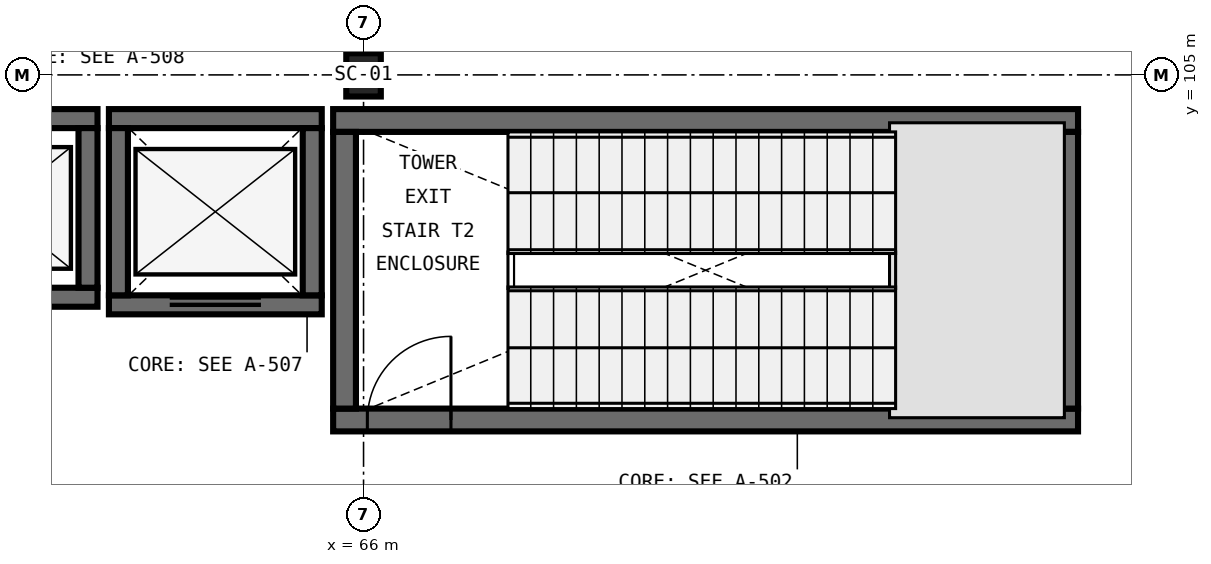
"""IFC4 building model, lengths in metres.
Left out: names, types, materials, properties, quantities, classifications, styles, units other than length and angle.
Written with IfcOpenShell. Run it as: python <this file> out.ifc"""

import sys

from ifc_helpers import new_model, si_unit, direction, frame, frame_2d, origin, origin_2d, place, context, subcontext, project, spatial, rectangle, i_section, extrude, element, fill, save


model = new_model("IFC4")
c1 = context("Model", 3, precision=1e-05, world=origin(), true_north=direction((0.0, 1.0)))
c2 = subcontext(c1, "Body", "Model", "MODEL_VIEW")
j1 = project(units=[si_unit("LENGTHUNIT", "METRE"), si_unit("PLANEANGLEUNIT", "RADIAN")], contexts=[c1])
p1 = place(None, origin())
s1 = spatial("IfcSite", under=j1, at=p1, CompositionType="ELEMENT")
p2 = place(p1, origin())
s2 = spatial("IfcBuilding", under=s1, at=p2, CompositionType="ELEMENT")
p3 = place(p2, frame((0.0, 0.0, 6.0)))
s3 = spatial("IfcBuildingStorey", under=s2, at=p3, CompositionType="ELEMENT", Elevation=6.0)
p4 = place(p3, frame((66.0, 105.0, 0.0), z_axis=(0.0, 0.0, 1.0), x_axis=(1.0, 0.0, 0.0)))
e1 = element("IfcColumn", 1, at=p4, inside=s3, PredefinedType="COLUMN", context=c2, shape_type="SweptSolid", body=[
    extrude(i_section(OverallWidth=0.454, OverallDepth=0.569, WebThickness=0.078, FlangeThickness=0.125, FilletRadius=0.031, at=origin_2d()), origin(), (0.0, 0.0, 1.0), 6.0),
])
p5 = place(p3, frame((65.6, 100.46, 0.0), z_axis=(0.0, 0.0, 1.0), x_axis=(1.0, 0.0, 0.0)))
e2 = element("IfcWall", 2, at=p5, inside=s3, PredefinedType="SHEAR", context=c2, shape_type="SweptSolid", body=[
    extrude(rectangle(XDim=9.8, YDim=0.3, at=frame_2d((4.9, 0.0))), origin(), (0.0, 0.0, 1.0), 6.0),
])
p6 = place(p5, frame((0.45, 0.0, 0.0)))
e3 = element("IfcOpeningElement", 3, at=p6, cuts=e2, PredefinedType="OPENING", context=c2, shape_type="SweptSolid", body=[
    extrude(rectangle(XDim=1.1, YDim=2.2, at=frame_2d((0.55, 1.1))), frame((0.0, 0.165, 0.0), z_axis=(0.0, -1.0, 0.0), x_axis=(1.0, 0.0, 0.0)), (0.0, 0.0, 1.0), 0.33),
])
p7 = place(p3, frame((75.4, 104.4, 0.0), z_axis=(0.0, 0.0, 1.0), x_axis=(-1.0, 0.0, 0.0)))
e4 = element("IfcWall", 4, at=p7, inside=s3, PredefinedType="SHEAR", context=c2, shape_type="SweptSolid", body=[
    extrude(rectangle(XDim=9.8, YDim=0.3, at=frame_2d((4.9, 0.0))), origin(), (0.0, 0.0, 1.0), 6.0),
])
for number, where, z_axis, x_axis in (
    (5, (65.75, 104.25, 0.0), (0.0, 0.0, 1.0), (0.0, -1.0, 0.0)),
    (6, (75.25, 100.61, 0.0), (0.0, 0.0, 1.0), (0.0, 1.0, 0.0)),
):
    element("IfcWall", number, at=place(p3, frame(where, z_axis=z_axis, x_axis=x_axis)), inside=s3, PredefinedType="SHEAR", context=c2, shape_type="SweptSolid", body=[
        extrude(rectangle(XDim=3.64, YDim=0.3, at=frame_2d((1.82, 0.0))), origin(), (0.0, 0.0, 1.0), 6.0),
    ])
p8 = place(p3, frame((62.65, 101.975, 0.0), z_axis=(0.0, 0.0, 1.0), x_axis=(1.0, 0.0, 0.0)))
e7 = element("IfcWall", 7, at=p8, inside=s3, PredefinedType="SHEAR", context=c2, shape_type="SweptSolid", body=[
    extrude(rectangle(XDim=2.8, YDim=0.25, at=frame_2d((1.4, 0.0))), origin(), (0.0, 0.0, 1.0), 6.0),
])
p9 = place(p8, frame((0.8, 0.0, 0.0)))
e8 = element("IfcOpeningElement", 8, at=p9, cuts=e7, PredefinedType="OPENING", context=c2, shape_type="SweptSolid", body=[
    extrude(rectangle(XDim=1.2, YDim=2.2, at=frame_2d((0.6, 1.1))), frame((0.0, 0.14, 0.0), z_axis=(0.0, -1.0, 0.0), x_axis=(1.0, 0.0, 0.0)), (0.0, 0.0, 1.0), 0.28),
])
p10 = place(p3, frame((65.45, 104.425, 0.0), z_axis=(0.0, 0.0, 1.0), x_axis=(-1.0, 0.0, 0.0)))
e9 = element("IfcWall", 9, at=p10, inside=s3, PredefinedType="SHEAR", context=c2, shape_type="SweptSolid", body=[
    extrude(rectangle(XDim=2.8, YDim=0.25, at=frame_2d((1.4, 0.0))), origin(), (0.0, 0.0, 1.0), 6.0),
])
for number, where, z_axis, x_axis in (
    (10, (62.775, 104.3, 0.0), (0.0, 0.0, 1.0), (0.0, -1.0, 0.0)),
    (11, (65.325, 102.1, 0.0), (0.0, 0.0, 1.0), (0.0, 1.0, 0.0)),
):
    element("IfcWall", number, at=place(p3, frame(where, z_axis=z_axis, x_axis=x_axis)), inside=s3, PredefinedType="SHEAR", context=c2, shape_type="SweptSolid", body=[
        extrude(rectangle(XDim=2.2, YDim=0.25, at=frame_2d((1.1, 0.0))), origin(), (0.0, 0.0, 1.0), 6.0),
    ])
p11 = place(p3, frame((59.8, 102.075, 0.0), z_axis=(0.0, 0.0, 1.0), x_axis=(1.0, 0.0, 0.0)))
e12 = element("IfcWall", 12, at=p11, inside=s3, PredefinedType="SHEAR", context=c2, shape_type="SweptSolid", body=[
    extrude(rectangle(XDim=2.7, YDim=0.25, at=frame_2d((1.35, 0.0))), origin(), (0.0, 0.0, 1.0), 6.0),
])
p12 = place(p11, frame((0.8, 0.0, 0.0)))
e13 = element("IfcOpeningElement", 13, at=p12, cuts=e12, PredefinedType="OPENING", context=c2, shape_type="SweptSolid", body=[
    extrude(rectangle(XDim=1.1, YDim=2.2, at=frame_2d((0.55, 1.1))), frame((0.0, 0.14, 0.0), z_axis=(0.0, -1.0, 0.0), x_axis=(1.0, 0.0, 0.0)), (0.0, 0.0, 1.0), 0.28),
])
p13 = place(p3, frame((62.5, 104.425, 0.0), z_axis=(0.0, 0.0, 1.0), x_axis=(-1.0, 0.0, 0.0)))
e14 = element("IfcWall", 14, at=p13, inside=s3, PredefinedType="SHEAR", context=c2, shape_type="SweptSolid", body=[
    extrude(rectangle(XDim=2.7, YDim=0.25, at=frame_2d((1.35, 0.0))), origin(), (0.0, 0.0, 1.0), 6.0),
])
p14 = place(p3, frame((62.375, 102.2, 0.0), z_axis=(0.0, 0.0, 1.0), x_axis=(0.0, 1.0, 0.0)))
e15 = element("IfcWall", 15, at=p14, inside=s3, PredefinedType="SHEAR", context=c2, shape_type="SweptSolid", body=[
    extrude(rectangle(XDim=2.1, YDim=0.25, at=frame_2d((1.05, 0.0))), origin(), (0.0, 0.0, 1.0), 6.0),
])
p15 = place(p6, origin())
e16 = element("IfcDoor", 16, at=p15, inside=s3, OperationType="SINGLE_SWING_RIGHT", PredefinedType="DOOR", context=c2, shape_type="SweptSolid", body=[
    extrude(rectangle(XDim=1.1, YDim=2.2, at=frame_2d((0.55, 1.1))), frame((0.0, 0.025, 0.0), z_axis=(0.0, -1.0, 0.0), x_axis=(1.0, 0.0, 0.0)), (0.0, 0.0, 1.0), 0.05),
])
fill(e3, e16)
p16 = place(p9, origin())
e17 = element("IfcDoor", 17, at=p16, inside=s3, OperationType="DOUBLE_DOOR_SLIDING", PredefinedType="DOOR", context=c2, shape_type="SweptSolid", body=[
    extrude(rectangle(XDim=1.2, YDim=2.2, at=frame_2d((0.6, 1.1))), frame((0.0, 0.025, 0.0), z_axis=(0.0, -1.0, 0.0), x_axis=(1.0, 0.0, 0.0)), (0.0, 0.0, 1.0), 0.05),
])
fill(e8, e17)
save(model, sys.argv[1])
